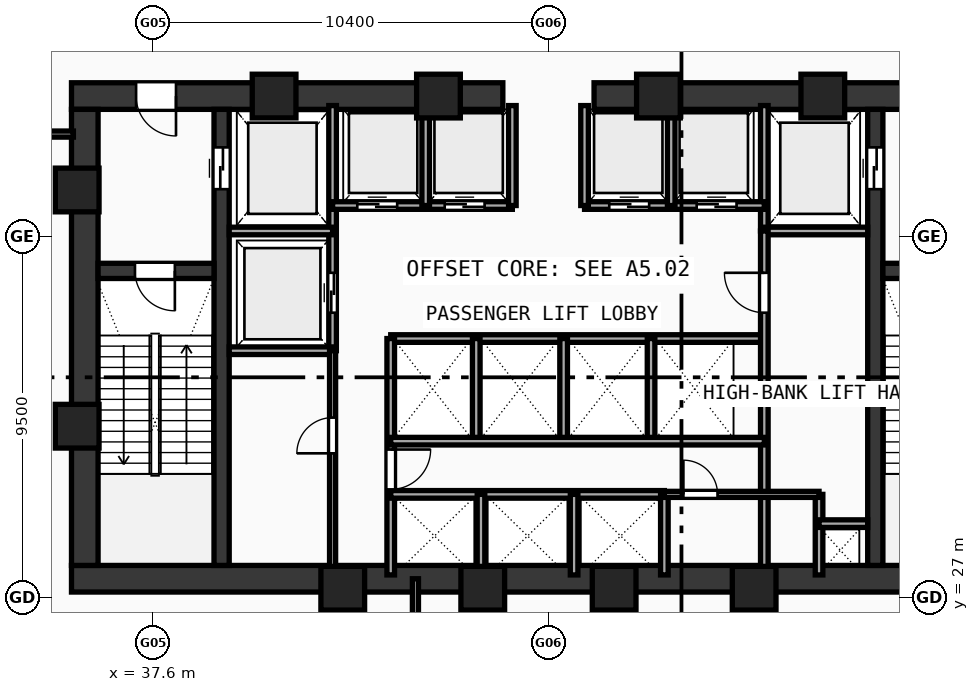
"""IFC4 building model, lengths in metres.
Left out: names, types, materials, properties, quantities, classifications, styles, units other than length and angle.
Written with IfcOpenShell. Run it as: python <this file> out.ifc"""

import sys

from ifc_helpers import new_model, si_unit, direction, frame, frame_2d, origin, origin_with_axes, origin_2d, place, context, subcontext, project, spatial, rectangle, hollow_rectangle, extrude, source, transform, mapped, element, fill, save


model = new_model("IFC4")
c1 = context("Model", 3, precision=1e-05, world=origin(), true_north=direction((0.0, 1.0)))
c2 = subcontext(c1, "Body", "Model", "MODEL_VIEW")
j1 = project(units=[si_unit("LENGTHUNIT", "METRE"), si_unit("PLANEANGLEUNIT", "RADIAN")], contexts=[c1])
p1 = place(None, origin())
s1 = spatial("IfcSite", under=j1, at=p1, CompositionType="ELEMENT")
p2 = place(p1, origin())
s2 = spatial("IfcBuilding", under=s1, at=p2, CompositionType="ELEMENT")
p3 = place(p2, frame((0.0, 0.0, 4.8)))
s3 = spatial("IfcBuildingStorey", under=s2, at=p3, CompositionType="ELEMENT", Elevation=4.8)
p4 = place(p3, frame((35.45, 27.5, 0.0), z_axis=(0.0, 0.0, 1.0), x_axis=(1.0, 0.0, 0.0)))
e1 = element("IfcWall", 1, at=p4, inside=s3, PredefinedType="SHEAR", context=c2, shape_type="SweptSolid", body=[
    extrude(rectangle(XDim=25.1, YDim=0.7, at=frame_2d((12.55, 0.0))), origin(), (0.0, 0.0, 1.0), 4.52),
])
p5 = place(p3, frame((35.45, 40.2, 0.0), z_axis=(0.0, 0.0, 1.0), x_axis=(1.0, 0.0, 0.0)))
e2 = element("IfcWall", 2, at=p5, inside=s3, PredefinedType="SHEAR", context=c2, shape_type="SweptSolid", body=[
    extrude(rectangle(XDim=11.35, YDim=0.7, at=frame_2d((5.675, 0.0))), origin(), (0.0, 0.0, 1.0), 4.52),
])
p6 = place(p5, frame((1.7, 0.0, 0.0)))
e3 = element("IfcOpeningElement", 3, at=p6, cuts=e2, PredefinedType="OPENING", context=c2, shape_type="SweptSolid", body=[
    extrude(rectangle(XDim=1.05, YDim=2.1, at=frame_2d((0.525, 1.05))), frame((0.0, 0.36, 0.0), z_axis=(0.0, -1.0, 0.0), x_axis=(1.0, 0.0, 0.0)), (0.0, 0.0, 1.0), 0.72),
])
p7 = place(p3, frame((49.2, 40.2, 0.0), z_axis=(0.0, 0.0, 1.0), x_axis=(1.0, 0.0, 0.0)))
e4 = element("IfcWall", 4, at=p7, inside=s3, PredefinedType="SHEAR", context=c2, shape_type="SweptSolid", body=[
    extrude(rectangle(XDim=11.35, YDim=0.7, at=frame_2d((5.675, 0.0))), origin(), (0.0, 0.0, 1.0), 4.52),
])
p8 = place(p7, frame((8.6, 0.0, 0.0)))
e5 = element("IfcOpeningElement", 5, at=p8, cuts=e4, PredefinedType="OPENING", context=c2, shape_type="SweptSolid", body=[
    extrude(rectangle(XDim=1.05, YDim=2.1, at=frame_2d((0.525, 1.05))), frame((0.0, 0.36, 0.0), z_axis=(0.0, -1.0, 0.0), x_axis=(1.0, 0.0, 0.0)), (0.0, 0.0, 1.0), 0.72),
])
p9 = place(p3, frame((35.8, 27.85, 0.0), z_axis=(0.0, 0.0, 1.0), x_axis=(0.0, 1.0, 0.0)))
e6 = element("IfcWall", 6, at=p9, inside=s3, PredefinedType="SHEAR", context=c2, shape_type="SweptSolid", body=[
    extrude(rectangle(XDim=12.0, YDim=0.7, at=frame_2d((6.0, 0.0))), origin(), (0.0, 0.0, 1.0), 4.52),
])
p10 = place(p3, frame((39.4, 27.85, 0.0), z_axis=(0.0, 0.0, 1.0), x_axis=(0.0, 1.0, 0.0)))
e7 = element("IfcWall", 7, at=p10, inside=s3, PredefinedType="SHEAR", context=c2, shape_type="SweptSolid", body=[
    extrude(rectangle(XDim=12.0, YDim=0.4, at=frame_2d((6.0, 0.0))), origin(), (0.0, 0.0, 1.0), 4.52),
])
p11 = place(p10, frame((9.9, 0.0, 0.0)))
e8 = element("IfcOpeningElement", 8, at=p11, cuts=e7, PredefinedType="OPENING", context=c2, shape_type="SweptSolid", body=[
    extrude(rectangle(XDim=1.1, YDim=2.1, at=frame_2d((0.55, 1.05))), frame((0.0, 0.21, 0.0), z_axis=(0.0, -1.0, 0.0), x_axis=(1.0, 0.0, 0.0)), (0.0, 0.0, 1.0), 0.42),
])
p12 = place(p3, frame((56.6, 27.85, 0.0), z_axis=(0.0, 0.0, 1.0), x_axis=(0.0, 1.0, 0.0)))
e9 = element("IfcWall", 9, at=p12, inside=s3, PredefinedType="SHEAR", context=c2, shape_type="SweptSolid", body=[
    extrude(rectangle(XDim=12.0, YDim=0.4, at=frame_2d((6.0, 0.0))), origin(), (0.0, 0.0, 1.0), 4.52),
])
p13 = place(p12, frame((9.9, 0.0, 0.0)))
e10 = element("IfcOpeningElement", 10, at=p13, cuts=e9, PredefinedType="OPENING", context=c2, shape_type="SweptSolid", body=[
    extrude(rectangle(XDim=1.1, YDim=2.1, at=frame_2d((0.55, 1.05))), frame((0.0, 0.21, 0.0), z_axis=(0.0, -1.0, 0.0), x_axis=(1.0, 0.0, 0.0)), (0.0, 0.0, 1.0), 0.42),
])
p14 = place(p3, frame((36.15, 35.6, 0.0), z_axis=(0.0, 0.0, 1.0), x_axis=(1.0, 0.0, 0.0)))
e11 = element("IfcWall", 11, at=p14, inside=s3, PredefinedType="SHEAR", context=c2, shape_type="SweptSolid", body=[
    extrude(rectangle(XDim=3.05, YDim=0.4, at=frame_2d((1.525, 0.0))), origin(), (0.0, 0.0, 1.0), 4.52),
])
p15 = place(p14, frame((0.97, 0.0, 0.0)))
e12 = element("IfcOpeningElement", 12, at=p15, cuts=e11, PredefinedType="OPENING", context=c2, shape_type="SweptSolid", body=[
    extrude(rectangle(XDim=1.05, YDim=2.1, at=frame_2d((0.525, 1.05))), frame((0.0, 0.21, 0.0), z_axis=(0.0, -1.0, 0.0), x_axis=(1.0, 0.0, 0.0)), (0.0, 0.0, 1.0), 0.42),
])
p16 = place(p3, frame((56.8, 35.6, 0.0), z_axis=(0.0, 0.0, 1.0), x_axis=(1.0, 0.0, 0.0)))
e13 = element("IfcWall", 13, at=p16, inside=s3, PredefinedType="SHEAR", context=c2, shape_type="SweptSolid", body=[
    extrude(rectangle(XDim=3.05, YDim=0.4, at=frame_2d((1.525, 0.0))), origin(), (0.0, 0.0, 1.0), 4.52),
])
p17 = place(p16, frame((1.02, 0.0, 0.0)))
e14 = element("IfcOpeningElement", 14, at=p17, cuts=e13, PredefinedType="OPENING", context=c2, shape_type="SweptSolid", body=[
    extrude(rectangle(XDim=1.05, YDim=2.1, at=frame_2d((0.525, 1.05))), frame((0.0, 0.21, 0.0), z_axis=(0.0, -1.0, 0.0), x_axis=(1.0, 0.0, 0.0)), (0.0, 0.0, 1.0), 0.42),
])
m1 = source(origin(), c2, "Body", "SweptSolid", [
    extrude(hollow_rectangle(XDim=1.15, YDim=1.15, WallThickness=0.048, at=origin_2d()), origin(), (0.0, 0.0, 1.0), 4.8),
])
for number, where, z_axis, x_axis in (
    (15, (42.588, 27.25, -0.28), (0.0, 0.0, 1.0), (1.0, 0.0, 0.0)),
    (16, (46.272, 27.25, -0.28), (0.0, 0.0, 1.0), (1.0, 0.0, 0.0)),
    (17, (49.729, 27.25, -0.28), (0.0, 0.0, 1.0), (1.0, 0.0, 0.0)),
    (18, (53.412, 27.25, -0.28), (0.0, 0.0, 1.0), (1.0, 0.0, 0.0)),
    (19, (55.219, 40.2, -0.28), (0.0, 0.0, 1.0), (1.0, 0.0, 0.0)),
    (20, (50.894, 40.2, -0.28), (0.0, 0.0, 1.0), (1.0, 0.0, 0.0)),
    (21, (45.106, 40.2, -0.28), (0.0, 0.0, 1.0), (1.0, 0.0, 0.0)),
    (22, (40.781, 40.2, -0.28), (0.0, 0.0, 1.0), (1.0, 0.0, 0.0)),
    (23, (35.6, 37.729, -0.28), (0.0, 0.0, 1.0), (1.0, 0.0, 0.0)),
    (24, (35.6, 31.513, -0.28), (0.0, 0.0, 1.0), (1.0, 0.0, 0.0)),
):
    element("IfcColumn", number, at=place(p3, frame(where, z_axis=z_axis, x_axis=x_axis)), inside=s3, PredefinedType="COLUMN", context=c2, shape_type="MappedRepresentation", body=[
        mapped(m1, transform((0.0, 0.0, 0.0), scale=1.0)),
    ])
p18 = place(p3, frame((42.32, 33.5, 0.0), z_axis=(0.0, 0.0, 1.0), x_axis=(0.0, 1.0, 0.0)))
e25 = element("IfcWall", 25, at=p18, inside=s3, PredefinedType="SOLIDWALL", context=c2, shape_type="SweptSolid", body=[
    extrude(rectangle(XDim=6.45, YDim=0.2, at=frame_2d((3.225, 0.0))), origin(), (0.0, 0.0, 1.0), 4.52),
])
p19 = place(p18, frame((1.0, 0.0, 0.0)))
e26 = element("IfcOpeningElement", 26, at=p19, cuts=e25, PredefinedType="OPENING", context=c2, shape_type="SweptSolid", body=[
    extrude(rectangle(XDim=1.05, YDim=2.1, at=frame_2d((0.525, 1.05))), frame((0.0, 0.11, 0.0), z_axis=(0.0, -1.0, 0.0), x_axis=(1.0, 0.0, 0.0)), (0.0, 0.0, 1.0), 0.22),
])
for number, where, z_axis, x_axis in (
    (27, (39.6, 36.65, 0.0), (0.0, 0.0, 1.0), (1.0, 0.0, 0.0)),
    (28, (39.6, 33.5, 0.0), (0.0, 0.0, 1.0), (1.0, 0.0, 0.0)),
):
    element("IfcWall", number, at=place(p3, frame(where, z_axis=z_axis, x_axis=x_axis)), inside=s3, PredefinedType="SOLIDWALL", context=c2, shape_type="SweptSolid", body=[
        extrude(rectangle(XDim=2.72, YDim=0.2, at=frame_2d((1.36, 0.0))), origin(), (0.0, 0.0, 1.0), 4.52),
    ])
p20 = place(p3, frame((53.68, 36.65, 0.0), z_axis=(0.0, 0.0, 1.0), x_axis=(0.0, 1.0, 0.0)))
e29 = element("IfcWall", 29, at=p20, inside=s3, PredefinedType="SOLIDWALL", context=c2, shape_type="SweptSolid", body=[
    extrude(rectangle(XDim=3.3, YDim=0.2, at=frame_2d((1.65, 0.0))), origin(), (0.0, 0.0, 1.0), 4.52),
])
p21 = place(p3, frame((53.68, 36.65, 0.0), z_axis=(0.0, 0.0, 1.0), x_axis=(1.0, 0.0, 0.0)))
e30 = element("IfcWall", 30, at=p21, inside=s3, PredefinedType="SOLIDWALL", context=c2, shape_type="SweptSolid", body=[
    extrude(rectangle(XDim=2.72, YDim=0.2, at=frame_2d((1.36, 0.0))), origin(), (0.0, 0.0, 1.0), 4.52),
])
p22 = place(p3, frame((42.32, 37.32, 0.0), z_axis=(0.0, 0.0, 1.0), x_axis=(1.0, 0.0, 0.0)))
e31 = element("IfcWall", 31, at=p22, inside=s3, PredefinedType="SOLIDWALL", context=c2, shape_type="SweptSolid", body=[
    extrude(rectangle(XDim=4.73, YDim=0.2, at=frame_2d((2.365, 0.0))), origin(), (0.0, 0.0, 1.0), 4.52),
])
p23 = place(p22, frame((0.65, 0.0, 0.0)))
e32 = element("IfcOpeningElement", 32, at=p23, cuts=e31, PredefinedType="OPENING", context=c2, shape_type="SweptSolid", body=[
    extrude(rectangle(XDim=1.05, YDim=2.1, at=frame_2d((0.525, 1.05))), frame((0.0, 0.11, 0.0), z_axis=(0.0, -1.0, 0.0), x_axis=(1.0, 0.0, 0.0)), (0.0, 0.0, 1.0), 0.22),
])
p24 = place(p22, frame((2.95, 0.0, 0.0)))
e33 = element("IfcOpeningElement", 33, at=p24, cuts=e31, PredefinedType="OPENING", context=c2, shape_type="SweptSolid", body=[
    extrude(rectangle(XDim=1.05, YDim=2.1, at=frame_2d((0.525, 1.05))), frame((0.0, 0.11, 0.0), z_axis=(0.0, -1.0, 0.0), x_axis=(1.0, 0.0, 0.0)), (0.0, 0.0, 1.0), 0.22),
])
p25 = place(p3, frame((48.95, 37.32, 0.0), z_axis=(0.0, 0.0, 1.0), x_axis=(1.0, 0.0, 0.0)))
e34 = element("IfcWall", 34, at=p25, inside=s3, PredefinedType="SOLIDWALL", context=c2, shape_type="SweptSolid", body=[
    extrude(rectangle(XDim=4.73, YDim=0.2, at=frame_2d((2.365, 0.0))), origin(), (0.0, 0.0, 1.0), 4.52),
])
p26 = place(p25, frame((0.65, 0.0, 0.0)))
e35 = element("IfcOpeningElement", 35, at=p26, cuts=e34, PredefinedType="OPENING", context=c2, shape_type="SweptSolid", body=[
    extrude(rectangle(XDim=1.05, YDim=2.1, at=frame_2d((0.525, 1.05))), frame((0.0, 0.11, 0.0), z_axis=(0.0, -1.0, 0.0), x_axis=(1.0, 0.0, 0.0)), (0.0, 0.0, 1.0), 0.22),
])
p27 = place(p25, frame((2.95, 0.0, 0.0)))
e36 = element("IfcOpeningElement", 36, at=p27, cuts=e34, PredefinedType="OPENING", context=c2, shape_type="SweptSolid", body=[
    extrude(rectangle(XDim=1.05, YDim=2.1, at=frame_2d((0.525, 1.05))), frame((0.0, 0.11, 0.0), z_axis=(0.0, -1.0, 0.0), x_axis=(1.0, 0.0, 0.0)), (0.0, 0.0, 1.0), 0.22),
])
for number, where, z_axis, x_axis in (
    (37, (47.05, 37.32, 0.0), (0.0, 0.0, 1.0), (0.0, 1.0, 0.0)),
    (38, (48.95, 37.32, 0.0), (0.0, 0.0, 1.0), (0.0, 1.0, 0.0)),
    (39, (44.77, 37.32, 0.0), (0.0, 0.0, 1.0), (0.0, 1.0, 0.0)),
    (40, (51.23, 37.32, 0.0), (0.0, 0.0, 1.0), (0.0, 1.0, 0.0)),
):
    element("IfcWall", number, at=place(p3, frame(where, z_axis=z_axis, x_axis=x_axis)), inside=s3, PredefinedType="SOLIDWALL", context=c2, shape_type="SweptSolid", body=[
        extrude(rectangle(XDim=2.63, YDim=0.2, at=frame_2d((1.315, 0.0))), origin(), (0.0, 0.0, 1.0), 4.52),
    ])
p28 = place(p3, frame((43.85, 33.82, 0.0), z_axis=(0.0, 0.0, 1.0), x_axis=(1.0, 0.0, 0.0)))
e41 = element("IfcWall", 41, at=p28, inside=s3, PredefinedType="SOLIDWALL", context=c2, shape_type="SweptSolid", body=[
    extrude(rectangle(XDim=9.83, YDim=0.2, at=frame_2d((4.915, 0.0))), origin(), (0.0, 0.0, 1.0), 4.52),
])
p29 = place(p3, frame((43.85, 27.6, 0.0), z_axis=(0.0, 0.0, 1.0), x_axis=(0.0, 1.0, 0.0)))
e42 = element("IfcWall", 42, at=p29, inside=s3, PredefinedType="SOLIDWALL", context=c2, shape_type="SweptSolid", body=[
    extrude(rectangle(XDim=6.22, YDim=0.2, at=frame_2d((3.11, 0.0))), origin(), (0.0, 0.0, 1.0), 4.52),
])
p30 = place(p29, frame((2.25, 0.0, 0.0)))
e43 = element("IfcOpeningElement", 43, at=p30, cuts=e42, PredefinedType="OPENING", context=c2, shape_type="SweptSolid", body=[
    extrude(rectangle(XDim=1.05, YDim=2.1, at=frame_2d((0.525, 1.05))), frame((0.0, 0.11, 0.0), z_axis=(0.0, -1.0, 0.0), x_axis=(1.0, 0.0, 0.0)), (0.0, 0.0, 1.0), 0.22),
])
p31 = place(p3, frame((53.68, 27.6, 0.0), z_axis=(0.0, 0.0, 1.0), x_axis=(0.0, 1.0, 0.0)))
e44 = element("IfcWall", 44, at=p31, inside=s3, PredefinedType="SOLIDWALL", context=c2, shape_type="SweptSolid", body=[
    extrude(rectangle(XDim=9.05, YDim=0.2, at=frame_2d((4.525, 0.0))), origin(), (0.0, 0.0, 1.0), 4.52),
])
p32 = place(p31, frame((6.9, 0.0, 0.0)))
e45 = element("IfcOpeningElement", 45, at=p32, cuts=e44, PredefinedType="OPENING", context=c2, shape_type="SweptSolid", body=[
    extrude(rectangle(XDim=1.05, YDim=2.1, at=frame_2d((0.525, 1.05))), frame((0.0, 0.11, 0.0), z_axis=(0.0, -1.0, 0.0), x_axis=(1.0, 0.0, 0.0)), (0.0, 0.0, 1.0), 0.22),
])
for number, where, z_axis, x_axis in (
    (46, (46.1, 31.12, 0.0), (0.0, 0.0, 1.0), (0.0, 1.0, 0.0)),
    (47, (48.4, 31.12, 0.0), (0.0, 0.0, 1.0), (0.0, 1.0, 0.0)),
    (48, (50.7, 31.12, 0.0), (0.0, 0.0, 1.0), (0.0, 1.0, 0.0)),
):
    element("IfcWall", number, at=place(p3, frame(where, z_axis=z_axis, x_axis=x_axis)), inside=s3, PredefinedType="SOLIDWALL", context=c2, shape_type="SweptSolid", body=[
        extrude(rectangle(XDim=2.7, YDim=0.2, at=frame_2d((1.35, 0.0))), origin(), (0.0, 0.0, 1.0), 4.52),
    ])
p33 = place(p3, frame((43.85, 29.72, 0.0), z_axis=(0.0, 0.0, 1.0), x_axis=(1.0, 0.0, 0.0)))
e49 = element("IfcWall", 49, at=p33, inside=s3, PredefinedType="SOLIDWALL", context=c2, shape_type="SweptSolid", body=[
    extrude(rectangle(XDim=7.2, YDim=0.2, at=frame_2d((3.6, 0.0))), origin(), (0.0, 0.0, 1.0), 4.52),
])
p34 = place(p3, frame((51.05, 27.6, 0.0), z_axis=(0.0, 0.0, 1.0), x_axis=(0.0, 1.0, 0.0)))
e50 = element("IfcWall", 50, at=p34, inside=s3, PredefinedType="SOLIDWALL", context=c2, shape_type="SweptSolid", body=[
    extrude(rectangle(XDim=2.12, YDim=0.2, at=frame_2d((1.06, 0.0))), origin(), (0.0, 0.0, 1.0), 4.52),
])
p35 = place(p3, frame((43.85, 31.12, 0.0), z_axis=(0.0, 0.0, 1.0), x_axis=(1.0, 0.0, 0.0)))
e51 = element("IfcWall", 51, at=p35, inside=s3, PredefinedType="SOLIDWALL", context=c2, shape_type="SweptSolid", body=[
    extrude(rectangle(XDim=9.83, YDim=0.2, at=frame_2d((4.915, 0.0))), origin(), (0.0, 0.0, 1.0), 4.52),
])
for number, where, z_axis, x_axis in (
    (52, (46.225, 27.6, 0.0), (0.0, 0.0, 1.0), (0.0, 1.0, 0.0)),
    (53, (48.675, 27.6, 0.0), (0.0, 0.0, 1.0), (0.0, 1.0, 0.0)),
    (54, (55.12, 27.6, 0.0), (0.0, 0.0, 1.0), (0.0, 1.0, 0.0)),
):
    element("IfcWall", number, at=place(p3, frame(where, z_axis=z_axis, x_axis=x_axis)), inside=s3, PredefinedType="SOLIDWALL", context=c2, shape_type="SweptSolid", body=[
        extrude(rectangle(XDim=2.12, YDim=0.2, at=frame_2d((1.06, 0.0))), origin(), (0.0, 0.0, 1.0), 4.52),
    ])
p36 = place(p3, frame((55.12, 28.95, 0.0), z_axis=(0.0, 0.0, 1.0), x_axis=(1.0, 0.0, 0.0)))
e55 = element("IfcWall", 55, at=p36, inside=s3, PredefinedType="SOLIDWALL", context=c2, shape_type="SweptSolid", body=[
    extrude(rectangle(XDim=1.28, YDim=0.2, at=frame_2d((0.64, 0.0))), origin(), (0.0, 0.0, 1.0), 4.52),
])
p37 = place(p3, frame((42.32, 27.6, 0.0), z_axis=(0.0, 0.0, 1.0), x_axis=(0.0, 1.0, 0.0)))
e56 = element("IfcWall", 56, at=p37, inside=s3, PredefinedType="PARTITIONING", context=c2, shape_type="SweptSolid", body=[
    extrude(rectangle(XDim=5.9, YDim=0.16, at=frame_2d((2.95, 0.0))), origin(), (0.0, 0.0, 1.0), 4.52),
])
p38 = place(p37, frame((3.2, 0.0, 0.0)))
e57 = element("IfcOpeningElement", 57, at=p38, cuts=e56, PredefinedType="OPENING", context=c2, shape_type="SweptSolid", body=[
    extrude(rectangle(XDim=0.94, YDim=2.1, at=frame_2d((0.47, 1.05))), frame((0.0, 0.09, 0.0), z_axis=(0.0, -1.0, 0.0), x_axis=(1.0, 0.0, 0.0)), (0.0, 0.0, 1.0), 0.18),
])
p39 = place(p3, frame((51.05, 29.72, 0.0), z_axis=(0.0, 0.0, 1.0), x_axis=(1.0, 0.0, 0.0)))
e58 = element("IfcWall", 58, at=p39, inside=s3, PredefinedType="PARTITIONING", context=c2, shape_type="SweptSolid", body=[
    extrude(rectangle(XDim=4.07, YDim=0.16, at=frame_2d((2.035, 0.0))), origin(), (0.0, 0.0, 1.0), 4.52),
])
p40 = place(p39, frame((0.5, 0.0, 0.0)))
e59 = element("IfcOpeningElement", 59, at=p40, cuts=e58, PredefinedType="OPENING", context=c2, shape_type="SweptSolid", body=[
    extrude(rectangle(XDim=0.9, YDim=2.1, at=frame_2d((0.45, 1.05))), frame((0.0, 0.09, 0.0), z_axis=(0.0, -1.0, 0.0), x_axis=(1.0, 0.0, 0.0)), (0.0, 0.0, 1.0), 0.18),
])
p41 = place(p3, frame((32.7, 39.2, 0.0), z_axis=(0.0, 0.0, 1.0), x_axis=(1.0, 0.0, 0.0)))
e60 = element("IfcWall", 60, at=p41, inside=s3, PredefinedType="PARTITIONING", context=c2, shape_type="SweptSolid", body=[
    extrude(rectangle(XDim=2.8, YDim=0.16, at=frame_2d((1.4, 0.0))), origin(), (0.0, 0.0, 1.0), 3.62),
])
p42 = place(p3, frame((44.5, 12.45, 0.0), z_axis=(0.0, 0.0, 1.0), x_axis=(0.0, 1.0, 0.0)))
e61 = element("IfcWall", 61, at=p42, inside=s3, PredefinedType="PARTITIONING", context=c2, shape_type="SweptSolid", body=[
    extrude(rectangle(XDim=15.05, YDim=0.16, at=frame_2d((7.525, 0.0))), origin(), (0.0, 0.0, 1.0), 3.62),
])
m2 = source(origin(), c2, "Body", "SweptSolid", [
    extrude(rectangle(XDim=1.05, YDim=2.1, at=frame_2d((0.525, 1.05))), frame((0.0, 0.025, 0.0), z_axis=(0.0, -1.0, 0.0), x_axis=(1.0, 0.0, 0.0)), (0.0, 0.0, 1.0), 0.05),
])
p43 = place(p15, frame((1.05, 0.0, 0.0), z_axis=(0.0, 0.0, 1.0), x_axis=(-1.0, 0.0, 0.0)))
e62 = element("IfcDoor", 62, at=p43, inside=s3, OperationType="SINGLE_SWING_LEFT", PredefinedType="DOOR", context=c2, shape_type="MappedRepresentation", body=[
    mapped(m2, transform((0.0, 0.0, 0.0), scale=1.0)),
])
fill(e12, e62)
p44 = place(p6, frame((1.05, 0.0, 0.0), z_axis=(0.0, 0.0, 1.0), x_axis=(-1.0, 0.0, 0.0)))
e63 = element("IfcDoor", 63, at=p44, inside=s3, OperationType="SINGLE_SWING_LEFT", PredefinedType="DOOR", context=c2, shape_type="MappedRepresentation", body=[
    mapped(m2, transform((0.0, 0.0, 0.0), scale=1.0)),
])
fill(e3, e63)
m3 = source(origin(), c2, "Body", "SweptSolid", [
    extrude(rectangle(XDim=1.1, YDim=2.1, at=frame_2d((0.55, 1.05))), frame((0.0, 0.025, 0.0), z_axis=(0.0, -1.0, 0.0), x_axis=(1.0, 0.0, 0.0)), (0.0, 0.0, 1.0), 0.05),
])
p45 = place(p11, frame((1.1, 0.0, 0.0), z_axis=(0.0, 0.0, 1.0), x_axis=(-1.0, 0.0, 0.0)))
e64 = element("IfcDoor", 64, at=p45, inside=s3, OperationType="DOUBLE_DOOR_SLIDING", PredefinedType="DOOR", context=c2, shape_type="MappedRepresentation", body=[
    mapped(m3, transform((0.0, 0.0, 0.0), scale=1.0)),
])
fill(e8, e64)
p46 = place(p13, origin_with_axes())
e65 = element("IfcDoor", 65, at=p46, inside=s3, OperationType="DOUBLE_DOOR_SLIDING", PredefinedType="DOOR", context=c2, shape_type="MappedRepresentation", body=[
    mapped(m3, transform((0.0, 0.0, 0.0), scale=1.0)),
])
fill(e10, e65)
p47 = place(p19, origin_with_axes())
e66 = element("IfcDoor", 66, at=p47, inside=s3, OperationType="DOUBLE_DOOR_SLIDING", PredefinedType="DOOR", context=c2, shape_type="MappedRepresentation", body=[
    mapped(m2, transform((0.0, 0.0, 0.0), scale=1.0)),
])
fill(e26, e66)
p48 = place(p23, frame((1.05, 0.0, 0.0), z_axis=(0.0, 0.0, 1.0), x_axis=(-1.0, 0.0, 0.0)))
e67 = element("IfcDoor", 67, at=p48, inside=s3, OperationType="DOUBLE_DOOR_SLIDING", PredefinedType="DOOR", context=c2, shape_type="MappedRepresentation", body=[
    mapped(m2, transform((0.0, 0.0, 0.0), scale=1.0)),
])
fill(e32, e67)
p49 = place(p24, frame((1.05, 0.0, 0.0), z_axis=(0.0, 0.0, 1.0), x_axis=(-1.0, 0.0, 0.0)))
e68 = element("IfcDoor", 68, at=p49, inside=s3, OperationType="DOUBLE_DOOR_SLIDING", PredefinedType="DOOR", context=c2, shape_type="MappedRepresentation", body=[
    mapped(m2, transform((0.0, 0.0, 0.0), scale=1.0)),
])
fill(e33, e68)
p50 = place(p26, frame((1.05, 0.0, 0.0), z_axis=(0.0, 0.0, 1.0), x_axis=(-1.0, 0.0, 0.0)))
e69 = element("IfcDoor", 69, at=p50, inside=s3, OperationType="DOUBLE_DOOR_SLIDING", PredefinedType="DOOR", context=c2, shape_type="MappedRepresentation", body=[
    mapped(m2, transform((0.0, 0.0, 0.0), scale=1.0)),
])
fill(e35, e69)
p51 = place(p27, frame((1.05, 0.0, 0.0), z_axis=(0.0, 0.0, 1.0), x_axis=(-1.0, 0.0, 0.0)))
e70 = element("IfcDoor", 70, at=p51, inside=s3, OperationType="DOUBLE_DOOR_SLIDING", PredefinedType="DOOR", context=c2, shape_type="MappedRepresentation", body=[
    mapped(m2, transform((0.0, 0.0, 0.0), scale=1.0)),
])
fill(e36, e70)
p52 = place(p30, frame((1.05, 0.0, 0.0), z_axis=(0.0, 0.0, 1.0), x_axis=(-1.0, 0.0, 0.0)))
e71 = element("IfcDoor", 71, at=p52, inside=s3, OperationType="SINGLE_SWING_LEFT", PredefinedType="DOOR", context=c2, shape_type="MappedRepresentation", body=[
    mapped(m2, transform((0.0, 0.0, 0.0), scale=1.0)),
])
fill(e43, e71)
p53 = place(p32, origin_with_axes())
e72 = element("IfcDoor", 72, at=p53, inside=s3, OperationType="SINGLE_SWING_RIGHT", PredefinedType="DOOR", context=c2, shape_type="MappedRepresentation", body=[
    mapped(m2, transform((0.0, 0.0, 0.0), scale=1.0)),
])
fill(e45, e72)
m4 = source(origin(), c2, "Body", "SweptSolid", [
    extrude(rectangle(XDim=0.94, YDim=2.1, at=frame_2d((0.47, 1.05))), frame((0.0, 0.025, 0.0), z_axis=(0.0, -1.0, 0.0), x_axis=(1.0, 0.0, 0.0)), (0.0, 0.0, 1.0), 0.05),
])
p54 = place(p38, origin_with_axes())
e73 = element("IfcDoor", 73, at=p54, inside=s3, OperationType="SINGLE_SWING_LEFT", PredefinedType="DOOR", context=c2, shape_type="MappedRepresentation", body=[
    mapped(m4, transform((0.0, 0.0, 0.0), scale=1.0)),
])
fill(e57, e73)
m5 = source(origin(), c2, "Body", "SweptSolid", [
    extrude(rectangle(XDim=0.9, YDim=2.1, at=frame_2d((0.45, 1.05))), frame((0.0, 0.025, 0.0), z_axis=(0.0, -1.0, 0.0), x_axis=(1.0, 0.0, 0.0)), (0.0, 0.0, 1.0), 0.05),
])
p55 = place(p40, origin_with_axes())
e74 = element("IfcDoor", 74, at=p55, inside=s3, OperationType="SINGLE_SWING_LEFT", PredefinedType="DOOR", context=c2, shape_type="MappedRepresentation", body=[
    mapped(m5, transform((0.0, 0.0, 0.0), scale=1.0)),
])
fill(e59, e74)
save(model, sys.argv[1])
